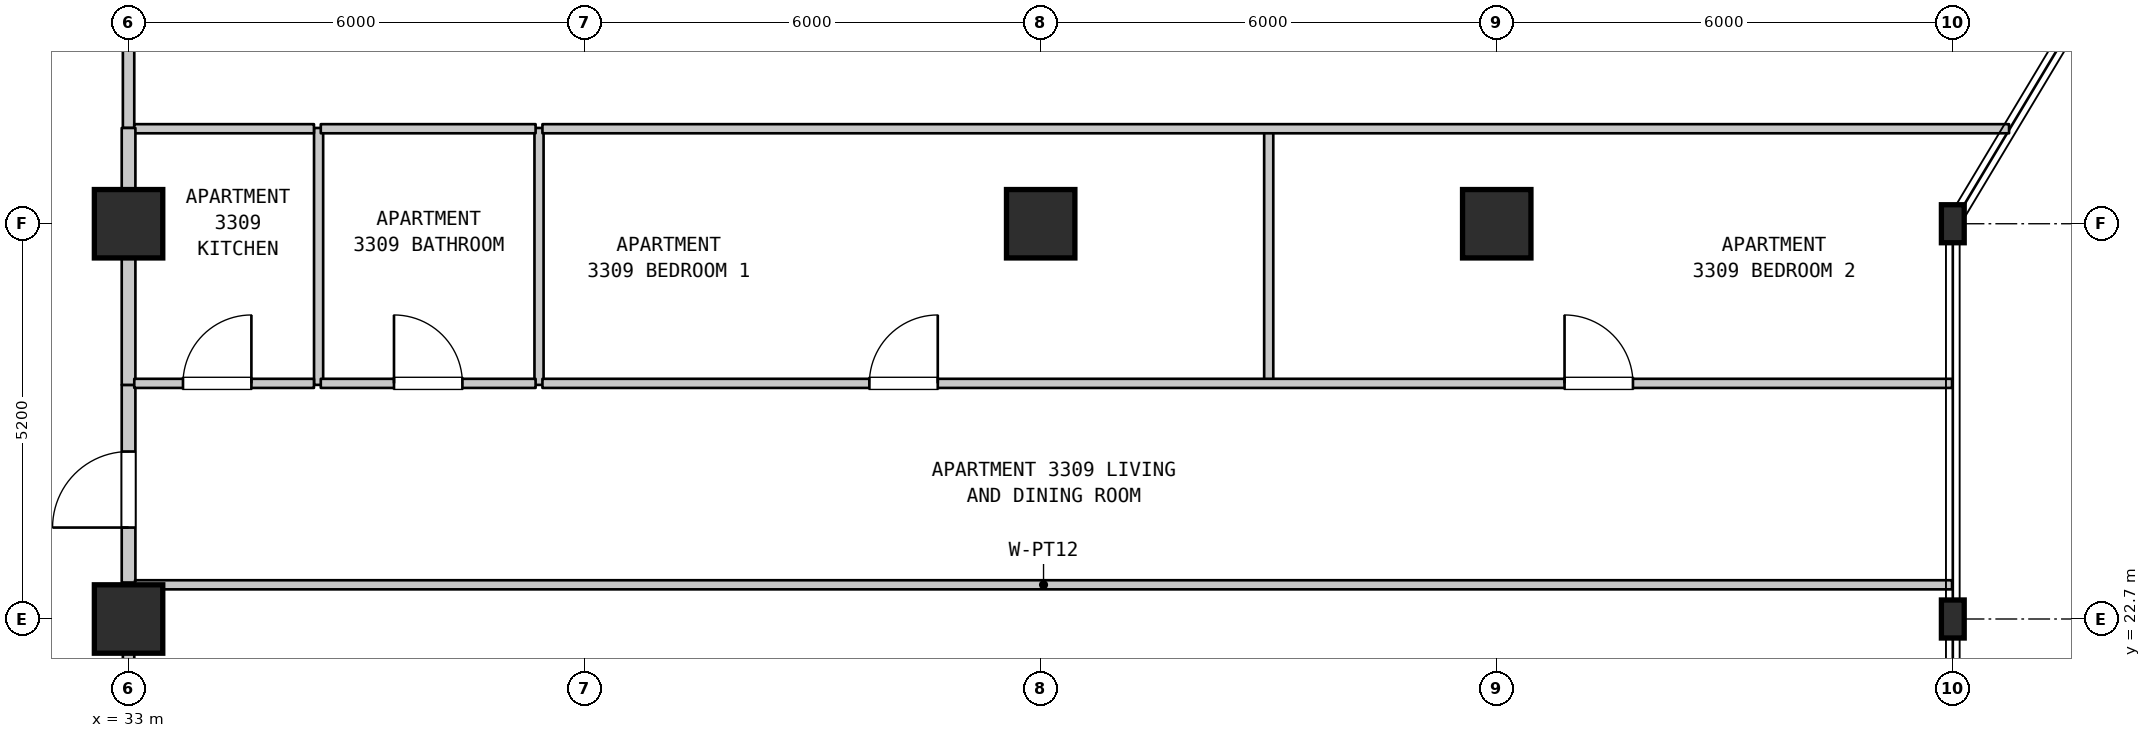
"""IFC4 building model, lengths in metres.
Left out: names, types, materials, properties, quantities, classifications, styles, units other than length and angle.
Written with IfcOpenShell. Run it as: python <this file> out.ifc"""

import sys

from ifc_helpers import new_model, si_unit, direction, frame, frame_2d, origin, origin_2d, place, context, subcontext, project, spatial, rectangle, i_section, extrude, element, fill, save


model = new_model("IFC4")
c1 = context("Model", 3, precision=1e-05, world=origin(), true_north=direction((0.0, 1.0)))
c2 = subcontext(c1, "Body", "Model", "MODEL_VIEW")
j1 = project(units=[si_unit("LENGTHUNIT", "METRE"), si_unit("PLANEANGLEUNIT", "RADIAN")], contexts=[c1])
p1 = place(None, origin())
s1 = spatial("IfcSite", under=j1, at=p1, CompositionType="ELEMENT")
p2 = place(p1, origin())
s2 = spatial("IfcBuilding", under=s1, at=p2, CompositionType="ELEMENT")
p3 = place(p2, frame((0.0, 0.0, 137.2)))
s3 = spatial("IfcBuildingStorey", under=s2, at=p3, CompositionType="ELEMENT", Elevation=137.2)
for number, where, z_axis, x_axis in (
    (1, (33.0, 22.7, 0.0), (0.0, 0.0, 1.0), (1.0, 0.0, 0.0)),
    (2, (33.0, 27.9, 0.0), (0.0, 0.0, 1.0), (1.0, 0.0, 0.0)),
    (3, (45.0, 27.9, 0.0), (0.0, 0.0, 1.0), (1.0, 0.0, 0.0)),
    (4, (51.0, 27.9, 0.0), (0.0, 0.0, 1.0), (1.0, 0.0, 0.0)),
):
    element("IfcColumn", number, at=place(p3, frame(where, z_axis=z_axis, x_axis=x_axis)), inside=s3, PredefinedType="COLUMN", context=c2, shape_type="SweptSolid", body=[
        extrude(rectangle(XDim=0.9, YDim=0.9, at=origin_2d()), origin(), (0.0, 0.0, 1.0), 3.7),
    ])
for number, where, z_axis, x_axis in (
    (5, (57.0, 22.7, 0.0), (0.0, 0.0, 1.0), (1.0, 0.0, 0.0)),
    (6, (57.0, 27.9, 0.0), (0.0, 0.0, 1.0), (1.0, 0.0, 0.0)),
):
    element("IfcColumn", number, at=place(p3, frame(where, z_axis=z_axis, x_axis=x_axis)), inside=s3, PredefinedType="COLUMN", context=c2, shape_type="SweptSolid", body=[
        extrude(i_section(OverallWidth=0.3, OverallDepth=0.5, WebThickness=0.014, FlangeThickness=0.028, FilletRadius=0.027, at=origin_2d()), origin(), (0.0, 0.0, 1.0), 3.7),
    ])
p4 = place(p3, frame((33.0, 19.51, 0.0), z_axis=(0.0, 0.0, 1.0), x_axis=(0.0, 1.0, 0.0)))
e7 = element("IfcWall", 7, at=p4, inside=s3, PredefinedType="STANDARD", context=c2, shape_type="SweptSolid", body=[
    extrude(rectangle(XDim=3.66, YDim=0.15, at=frame_2d((1.83, 0.0))), origin(), (0.0, 0.0, 1.0), 2.935),
])
p5 = place(p4, frame((1.258, 0.0, 0.0)))
e8 = element("IfcOpeningElement", 8, at=p5, cuts=e7, PredefinedType="OPENING", context=c2, shape_type="SweptSolid", body=[
    extrude(rectangle(XDim=1.0, YDim=2.15, at=frame_2d((0.5, 1.075))), frame((0.0, 0.085, 0.0), z_axis=(0.0, -1.0, 0.0), x_axis=(1.0, 0.0, 0.0)), (0.0, 0.0, 1.0), 0.17),
])
p6 = place(p3, frame((33.0, 23.18, 0.0), z_axis=(0.0, 0.0, 1.0), x_axis=(0.0, 1.0, 0.0)))
e9 = element("IfcWall", 9, at=p6, inside=s3, PredefinedType="STANDARD", context=c2, shape_type="SweptSolid", body=[
    extrude(rectangle(XDim=2.6, YDim=0.18, at=frame_2d((1.3, 0.0))), origin(), (0.0, 0.0, 1.0), 2.935),
])
p7 = place(p6, frame((0.723, 0.0, 0.0)))
e10 = element("IfcOpeningElement", 10, at=p7, cuts=e9, PredefinedType="OPENING", context=c2, shape_type="SweptSolid", body=[
    extrude(rectangle(XDim=1.0, YDim=2.15, at=frame_2d((0.5, 1.075))), frame((0.0, 0.1, 0.0), z_axis=(0.0, -1.0, 0.0), x_axis=(1.0, 0.0, 0.0)), (0.0, 0.0, 1.0), 0.2),
])
p8 = place(p3, frame((33.0, 25.78, 0.0), z_axis=(0.0, 0.0, 1.0), x_axis=(0.0, 1.0, 0.0)))
e11 = element("IfcWall", 11, at=p8, inside=s3, PredefinedType="STANDARD", context=c2, shape_type="SweptSolid", body=[
    extrude(rectangle(XDim=2.12, YDim=0.18, at=frame_2d((1.06, 0.0))), origin(), (0.0, 0.0, 1.0), 2.935),
])
p9 = place(p3, frame((33.0, 29.16, 0.0), z_axis=(0.0, 0.0, 1.0), x_axis=(0.0, 1.0, 0.0)))
e12 = element("IfcWall", 12, at=p9, inside=s3, PredefinedType="STANDARD", context=c2, shape_type="SweptSolid", body=[
    extrude(rectangle(XDim=8.74, YDim=0.15, at=frame_2d((4.37, 0.0))), origin(), (0.0, 0.0, 1.0), 2.885),
])
p10 = place(p9, frame((3.799, 0.0, 0.0)))
e13 = element("IfcOpeningElement", 13, at=p10, cuts=e12, PredefinedType="OPENING", context=c2, shape_type="SweptSolid", body=[
    extrude(rectangle(XDim=1.0, YDim=2.15, at=frame_2d((0.5, 1.075))), frame((0.0, 0.085, 0.0), z_axis=(0.0, -1.0, 0.0), x_axis=(1.0, 0.0, 0.0)), (0.0, 0.0, 1.0), 0.17),
])
for number, where, z_axis, x_axis in (
    (14, (35.5, 25.78, 0.0), (0.0, 0.0, 1.0), (0.0, 1.0, 0.0)),
    (15, (38.4, 25.78, 0.0), (0.0, 0.0, 1.0), (0.0, 1.0, 0.0)),
    (16, (48.0, 25.78, 0.0), (0.0, 0.0, 1.0), (0.0, 1.0, 0.0)),
):
    element("IfcWall", number, at=place(p3, frame(where, z_axis=z_axis, x_axis=x_axis)), inside=s3, PredefinedType="PARTITIONING", context=c2, shape_type="SweptSolid", body=[
        extrude(rectangle(XDim=3.38, YDim=0.12, at=frame_2d((1.69, 0.0))), origin(), (0.0, 0.0, 1.0), 3.385),
    ])
p11 = place(p3, frame((33.085, 23.15, 0.0), z_axis=(0.0, 0.0, 1.0), x_axis=(1.0, 0.0, 0.0)))
e17 = element("IfcWall", 17, at=p11, inside=s3, PredefinedType="PARTITIONING", context=c2, shape_type="SweptSolid", body=[
    extrude(rectangle(XDim=23.905, YDim=0.12, at=frame_2d((11.953, 0.0))), origin(), (0.0, 0.0, 1.0), 3.385),
])
p12 = place(p3, frame((33.075, 25.8, 0.0), z_axis=(0.0, 0.0, 1.0), x_axis=(1.0, 0.0, 0.0)))
e18 = element("IfcWall", 18, at=p12, inside=s3, PredefinedType="PARTITIONING", context=c2, shape_type="SweptSolid", body=[
    extrude(rectangle(XDim=2.364, YDim=0.12, at=frame_2d((1.182, 0.0))), origin(), (0.0, 0.0, 1.0), 3.385),
])
p13 = place(p12, frame((0.641, 0.0, 0.0)))
e19 = element("IfcOpeningElement", 19, at=p13, cuts=e18, PredefinedType="OPENING", context=c2, shape_type="SweptSolid", body=[
    extrude(rectangle(XDim=0.9, YDim=2.15, at=frame_2d((0.45, 1.075))), frame((0.0, 0.07, 0.0), z_axis=(0.0, -1.0, 0.0), x_axis=(1.0, 0.0, 0.0)), (0.0, 0.0, 1.0), 0.14),
])
p14 = place(p3, frame((35.529, 25.8, 0.0), z_axis=(0.0, 0.0, 1.0), x_axis=(1.0, 0.0, 0.0)))
e20 = element("IfcWall", 20, at=p14, inside=s3, PredefinedType="PARTITIONING", context=c2, shape_type="SweptSolid", body=[
    extrude(rectangle(XDim=2.826, YDim=0.12, at=frame_2d((1.413, 0.0))), origin(), (0.0, 0.0, 1.0), 3.385),
])
p15 = place(p14, frame((0.963, 0.0, 0.0)))
e21 = element("IfcOpeningElement", 21, at=p15, cuts=e20, PredefinedType="OPENING", context=c2, shape_type="SweptSolid", body=[
    extrude(rectangle(XDim=0.9, YDim=2.1, at=frame_2d((0.45, 1.05))), frame((0.0, 0.07, 0.0), z_axis=(0.0, -1.0, 0.0), x_axis=(1.0, 0.0, 0.0)), (0.0, 0.0, 1.0), 0.14),
])
p16 = place(p3, frame((38.445, 25.8, 0.0), z_axis=(0.0, 0.0, 1.0), x_axis=(1.0, 0.0, 0.0)))
e22 = element("IfcWall", 22, at=p16, inside=s3, PredefinedType="PARTITIONING", context=c2, shape_type="SweptSolid", body=[
    extrude(rectangle(XDim=18.545, YDim=0.12, at=frame_2d((9.272, 0.0))), origin(), (0.0, 0.0, 1.0), 3.385),
])
p17 = place(p16, frame((4.301, 0.0, 0.0)))
e23 = element("IfcOpeningElement", 23, at=p17, cuts=e22, PredefinedType="OPENING", context=c2, shape_type="SweptSolid", body=[
    extrude(rectangle(XDim=0.9, YDim=2.15, at=frame_2d((0.45, 1.075))), frame((0.0, 0.07, 0.0), z_axis=(0.0, -1.0, 0.0), x_axis=(1.0, 0.0, 0.0)), (0.0, 0.0, 1.0), 0.14),
])
p18 = place(p16, frame((13.447, 0.0, 0.0)))
e24 = element("IfcOpeningElement", 24, at=p18, cuts=e22, PredefinedType="OPENING", context=c2, shape_type="SweptSolid", body=[
    extrude(rectangle(XDim=0.9, YDim=2.15, at=frame_2d((0.45, 1.075))), frame((0.0, 0.07, 0.0), z_axis=(0.0, -1.0, 0.0), x_axis=(1.0, 0.0, 0.0)), (0.0, 0.0, 1.0), 0.14),
])
p19 = place(p3, frame((33.075, 29.15, 0.0), z_axis=(0.0, 0.0, 1.0), x_axis=(1.0, 0.0, 0.0)))
e25 = element("IfcWall", 25, at=p19, inside=s3, PredefinedType="PARTITIONING", context=c2, shape_type="SweptSolid", body=[
    extrude(rectangle(XDim=2.364, YDim=0.12, at=frame_2d((1.182, 0.0))), origin(), (0.0, 0.0, 1.0), 3.385),
])
p20 = place(p3, frame((35.529, 29.15, 0.0), z_axis=(0.0, 0.0, 1.0), x_axis=(1.0, 0.0, 0.0)))
e26 = element("IfcWall", 26, at=p20, inside=s3, PredefinedType="PARTITIONING", context=c2, shape_type="SweptSolid", body=[
    extrude(rectangle(XDim=2.826, YDim=0.12, at=frame_2d((1.413, 0.0))), origin(), (0.0, 0.0, 1.0), 3.385),
])
p21 = place(p3, frame((38.445, 29.15, 0.0), z_axis=(0.0, 0.0, 1.0), x_axis=(1.0, 0.0, 0.0)))
e27 = element("IfcWall", 27, at=p21, inside=s3, PredefinedType="PARTITIONING", context=c2, shape_type="SweptSolid", body=[
    extrude(rectangle(XDim=19.295, YDim=0.12, at=frame_2d((9.647, 0.0))), origin(), (0.0, 0.0, 1.0), 3.385),
])
p22 = place(p3, frame((33.0, 27.9, 0.0), z_axis=(0.0, 0.0, 1.0), x_axis=(0.0, 1.0, 0.0)))
e28 = element("IfcWall", 28, at=p22, inside=s3, PredefinedType="STANDARD", context=c2, shape_type="SweptSolid", body=[
    extrude(rectangle(XDim=1.26, YDim=0.18, at=frame_2d((0.63, 0.0))), origin(), (0.0, 0.0, 1.0), 2.885),
])
p23 = place(p7, origin())
e29 = element("IfcDoor", 29, at=p23, inside=s3, OperationType="SINGLE_SWING_LEFT", PredefinedType="DOOR", context=c2, shape_type="SweptSolid", body=[
    extrude(rectangle(XDim=1.0, YDim=2.15, at=frame_2d((0.5, 1.075))), frame((0.0, 0.025, 0.0), z_axis=(0.0, -1.0, 0.0), x_axis=(1.0, 0.0, 0.0)), (0.0, 0.0, 1.0), 0.05),
])
fill(e10, e29)
p24 = place(p13, origin())
e30 = element("IfcDoor", 30, at=p24, inside=s3, OperationType="SINGLE_SWING_RIGHT", PredefinedType="DOOR", context=c2, shape_type="SweptSolid", body=[
    extrude(rectangle(XDim=0.9, YDim=2.15, at=frame_2d((0.45, 1.075))), frame((0.0, 0.025, 0.0), z_axis=(0.0, -1.0, 0.0), x_axis=(1.0, 0.0, 0.0)), (0.0, 0.0, 1.0), 0.05),
])
fill(e19, e30)
p25 = place(p15, origin())
e31 = element("IfcDoor", 31, at=p25, inside=s3, OperationType="SINGLE_SWING_LEFT", PredefinedType="DOOR", context=c2, shape_type="SweptSolid", body=[
    extrude(rectangle(XDim=0.9, YDim=2.1, at=frame_2d((0.45, 1.05))), frame((0.0, 0.025, 0.0), z_axis=(0.0, -1.0, 0.0), x_axis=(1.0, 0.0, 0.0)), (0.0, 0.0, 1.0), 0.05),
])
fill(e21, e31)
p26 = place(p17, origin())
e32 = element("IfcDoor", 32, at=p26, inside=s3, OperationType="SINGLE_SWING_RIGHT", PredefinedType="DOOR", context=c2, shape_type="SweptSolid", body=[
    extrude(rectangle(XDim=0.9, YDim=2.15, at=frame_2d((0.45, 1.075))), frame((0.0, 0.025, 0.0), z_axis=(0.0, -1.0, 0.0), x_axis=(1.0, 0.0, 0.0)), (0.0, 0.0, 1.0), 0.05),
])
fill(e23, e32)
p27 = place(p18, origin())
e33 = element("IfcDoor", 33, at=p27, inside=s3, OperationType="SINGLE_SWING_LEFT", PredefinedType="DOOR", context=c2, shape_type="SweptSolid", body=[
    extrude(rectangle(XDim=0.9, YDim=2.15, at=frame_2d((0.45, 1.075))), frame((0.0, 0.025, 0.0), z_axis=(0.0, -1.0, 0.0), x_axis=(1.0, 0.0, 0.0)), (0.0, 0.0, 1.0), 0.05),
])
fill(e24, e33)
save(model, sys.argv[1])
